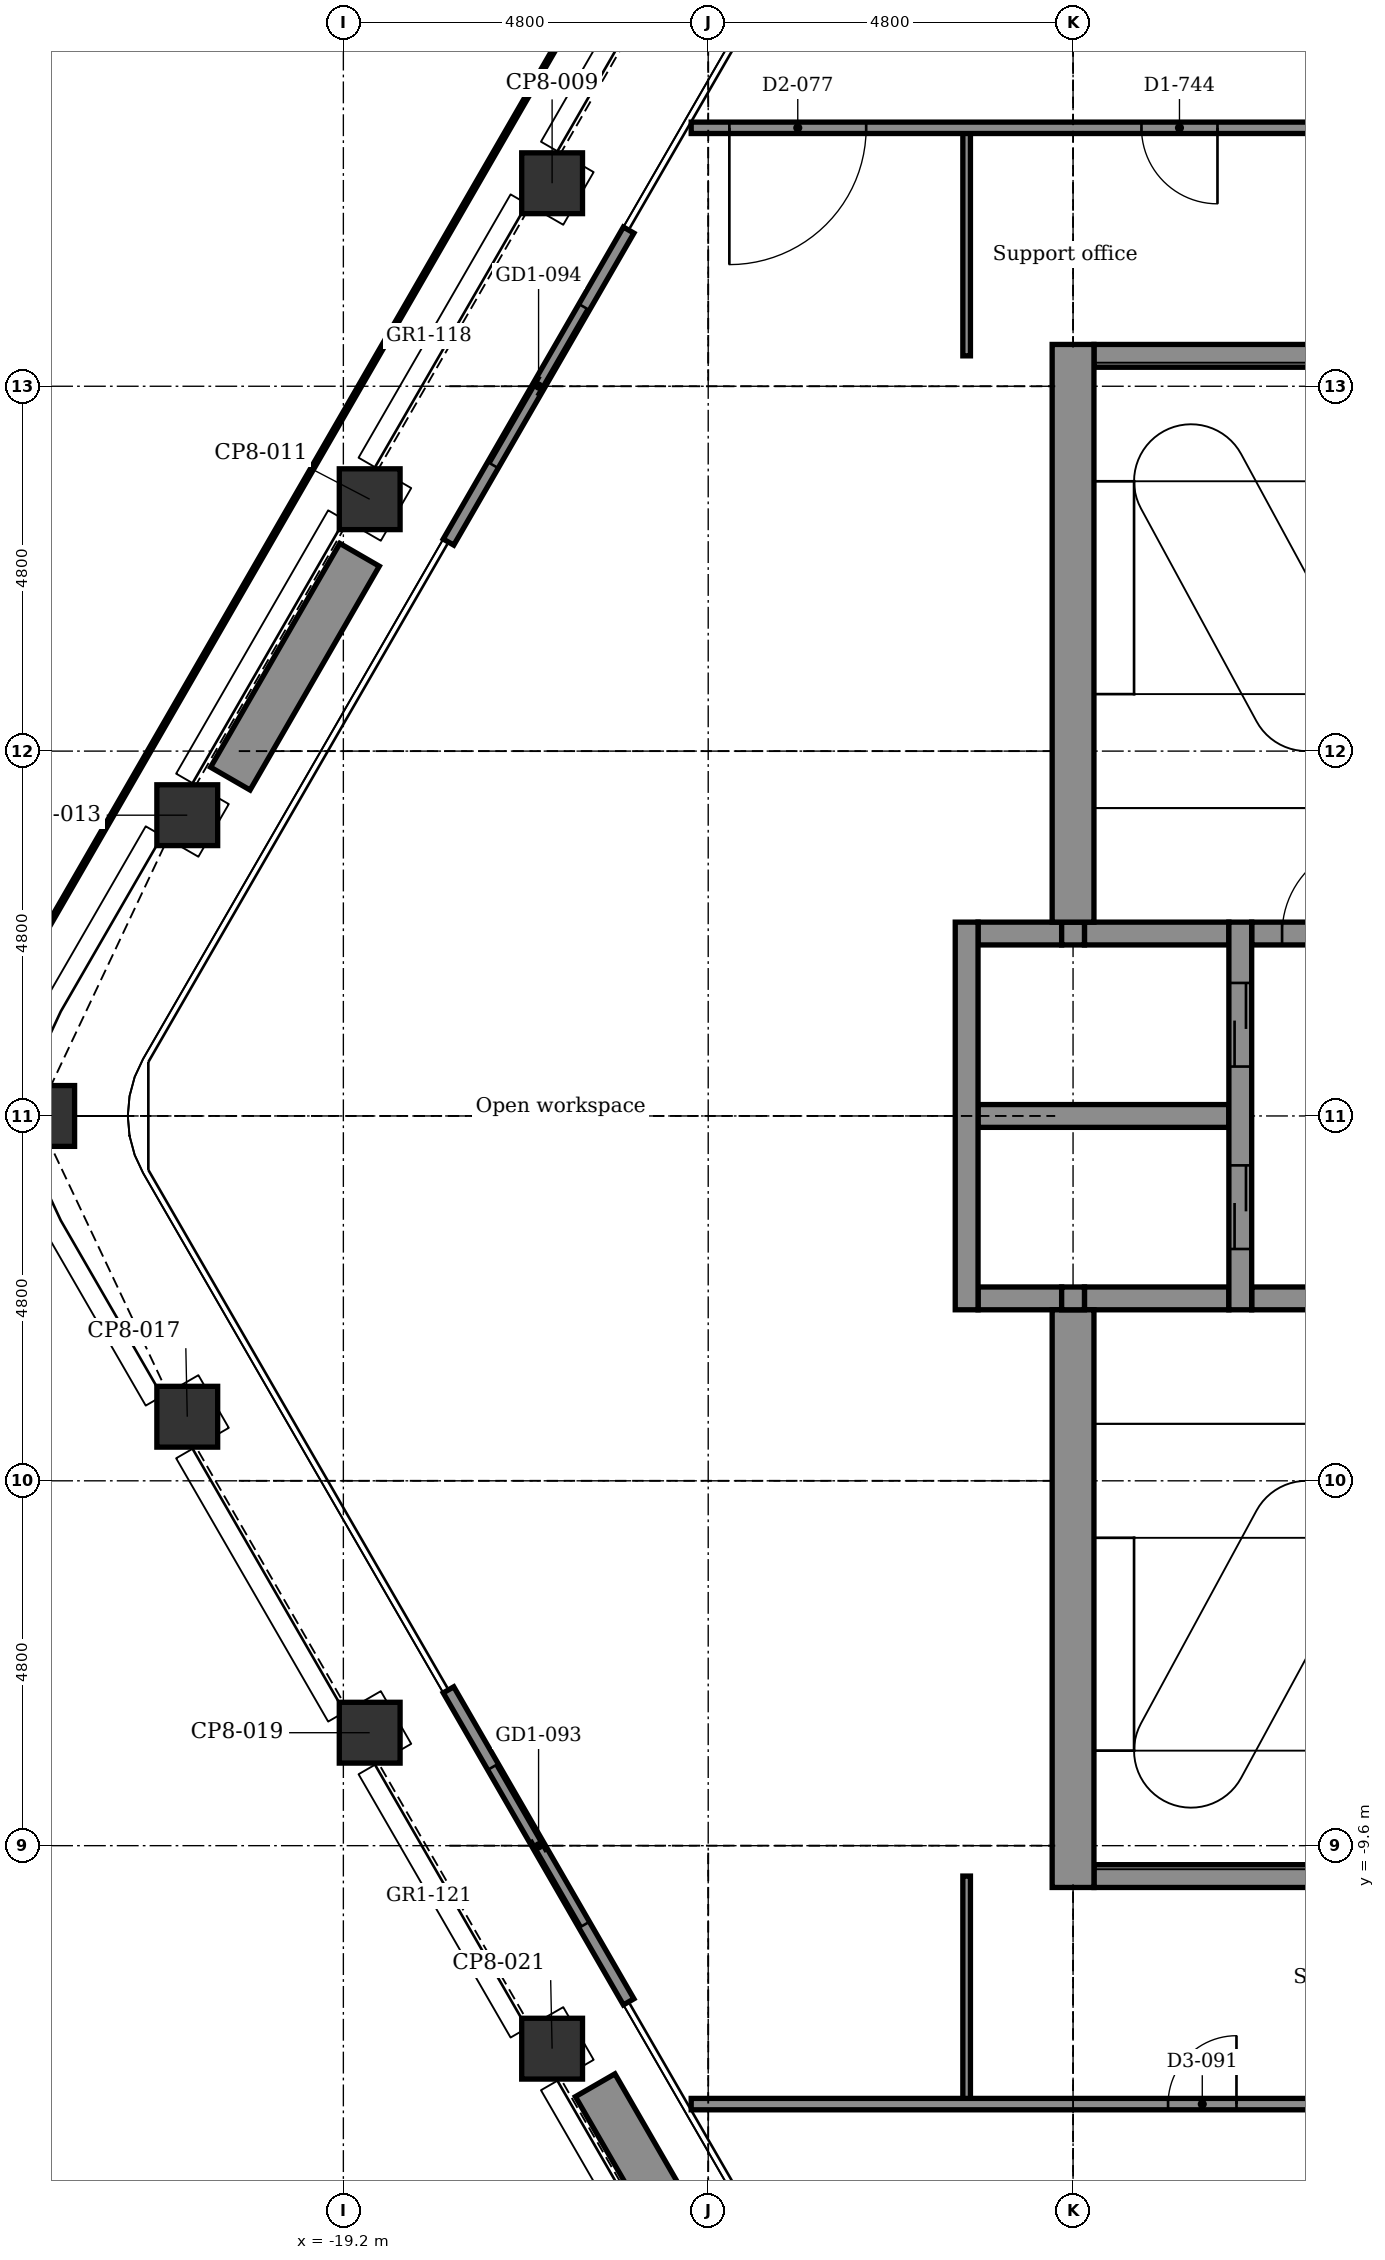
"""IFC4 building model, lengths in metres.
Left out: names, types, materials, properties, quantities, classifications, styles, units other than length and angle.
Written with IfcOpenShell. Run it as: python <this file> out.ifc"""

import sys

from ifc_helpers import new_model, si_unit, direction, frame, frame_2d, origin, origin_2d, place, context, subcontext, project, spatial, rectangle, extrude, element, fill, save


model = new_model("IFC4")
c1 = context("Model", 3, precision=1e-05, world=origin(), true_north=direction((0.0, 1.0)))
c2 = subcontext(c1, "Body", "Model", "MODEL_VIEW")
j1 = project(units=[si_unit("LENGTHUNIT", "METRE"), si_unit("PLANEANGLEUNIT", "RADIAN")], contexts=[c1])
p1 = place(None, origin())
s1 = spatial("IfcSite", under=j1, at=p1, CompositionType="ELEMENT")
p2 = place(p1, origin())
s2 = spatial("IfcBuilding", under=s1, at=p2, CompositionType="ELEMENT")
p3 = place(p2, frame((0.0, 0.0, 285.2)))
s3 = spatial("IfcBuildingStorey", under=s2, at=p3, CompositionType="ELEMENT", Elevation=285.2)
for number, where, z_axis, x_axis in (
    (1, (-16.454, -12.271, -0.15), (0.0, 0.0, 1.0), (0.866, 0.5, 0.0)),
    (2, (-18.854, -8.114, -0.15), (0.0, 0.0, 1.0), (0.866, 0.5, 0.0)),
    (3, (-21.254, -3.957, -0.15), (0.0, 0.0, 1.0), (0.866, 0.5, 0.0)),
    (4, (-23.136, 0.0, -0.15), (0.0, 0.0, 1.0), (1.0, 0.0, 0.0)),
    (5, (-21.254, 3.957, -0.15), (0.0, 0.0, 1.0), (0.5, 0.866, 0.0)),
    (6, (-18.854, 8.114, -0.15), (0.0, 0.0, 1.0), (0.5, 0.866, 0.0)),
    (7, (-16.454, 12.271, -0.15), (0.0, 0.0, 1.0), (0.5, 0.866, 0.0)),
):
    element("IfcColumn", number, at=place(p3, frame(where, z_axis=z_axis, x_axis=x_axis)), inside=s3, PredefinedType="COLUMN", context=c2, shape_type="SweptSolid", body=[
        extrude(rectangle(XDim=0.8, YDim=0.8, at=origin_2d()), origin(), (0.0, 0.0, 1.0), 3.9),
    ])
p4 = place(p3, frame((-9.325, -10.0, -0.15), z_axis=(0.0, 0.0, 1.0), x_axis=(1.0, 0.0, 0.0)))
e8 = element("IfcWall", 8, at=p4, inside=s3, PredefinedType="STANDARD", context=c2, shape_type="SweptSolid", body=[
    extrude(rectangle(XDim=4.075, YDim=0.3, at=frame_2d((2.038, 0.0))), origin(), (0.0, 0.0, 1.0), 3.9),
])
p5 = place(p3, frame((-10.85, -2.4, -0.15), z_axis=(0.0, 0.0, 1.0), x_axis=(1.0, 0.0, 0.0)))
e9 = element("IfcWall", 9, at=p5, inside=s3, PredefinedType="STANDARD", context=c2, shape_type="SweptSolid", body=[
    extrude(rectangle(XDim=1.1, YDim=0.3, at=frame_2d((0.55, 0.0))), origin(), (0.0, 0.0, 1.0), 3.9),
])
p6 = place(p3, frame((-9.45, -2.4, -0.15), z_axis=(0.0, 0.0, 1.0), x_axis=(1.0, 0.0, 0.0)))
e10 = element("IfcWall", 10, at=p6, inside=s3, PredefinedType="STANDARD", context=c2, shape_type="SweptSolid", body=[
    extrude(rectangle(XDim=1.9, YDim=0.3, at=frame_2d((0.95, 0.0))), origin(), (0.0, 0.0, 1.0), 3.9),
])
p7 = place(p3, frame((-7.25, -2.4, -0.15), z_axis=(0.0, 0.0, 1.0), x_axis=(1.0, 0.0, 0.0)))
e11 = element("IfcWall", 11, at=p7, inside=s3, PredefinedType="STANDARD", context=c2, shape_type="SweptSolid", body=[
    extrude(rectangle(XDim=2.0, YDim=0.3, at=frame_2d((1.0, 0.0))), origin(), (0.0, 0.0, 1.0), 3.9),
])
p8 = place(p3, frame((-10.85, 0.0, -0.15), z_axis=(0.0, 0.0, 1.0), x_axis=(1.0, 0.0, 0.0)))
e12 = element("IfcWall", 12, at=p8, inside=s3, PredefinedType="STANDARD", context=c2, shape_type="SweptSolid", body=[
    extrude(rectangle(XDim=3.3, YDim=0.3, at=frame_2d((1.65, 0.0))), origin(), (0.0, 0.0, 1.0), 3.9),
])
p9 = place(p3, frame((-10.85, 2.4, -0.15), z_axis=(0.0, 0.0, 1.0), x_axis=(1.0, 0.0, 0.0)))
e13 = element("IfcWall", 13, at=p9, inside=s3, PredefinedType="STANDARD", context=c2, shape_type="SweptSolid", body=[
    extrude(rectangle(XDim=1.1, YDim=0.3, at=frame_2d((0.55, 0.0))), origin(), (0.0, 0.0, 1.0), 3.9),
])
p10 = place(p3, frame((-9.45, 2.4, -0.15), z_axis=(0.0, 0.0, 1.0), x_axis=(1.0, 0.0, 0.0)))
e14 = element("IfcWall", 14, at=p10, inside=s3, PredefinedType="STANDARD", context=c2, shape_type="SweptSolid", body=[
    extrude(rectangle(XDim=1.9, YDim=0.3, at=frame_2d((0.95, 0.0))), origin(), (0.0, 0.0, 1.0), 3.9),
])
p11 = place(p3, frame((-7.25, 2.4, -0.15), z_axis=(0.0, 0.0, 1.0), x_axis=(1.0, 0.0, 0.0)))
e15 = element("IfcWall", 15, at=p11, inside=s3, PredefinedType="STANDARD", context=c2, shape_type="SweptSolid", body=[
    extrude(rectangle(XDim=2.0, YDim=0.3, at=frame_2d((1.0, 0.0))), origin(), (0.0, 0.0, 1.0), 3.9),
])
p12 = place(p11, frame((0.4, 0.0, 0.15)))
e16 = element("IfcOpeningElement", 16, at=p12, cuts=e15, PredefinedType="OPENING", context=c2, shape_type="SweptSolid", body=[
    extrude(rectangle(XDim=1.2, YDim=2.1, at=frame_2d((0.6, 1.05))), frame((0.0, 0.16, 0.0), z_axis=(0.0, -1.0, 0.0), x_axis=(1.0, 0.0, 0.0)), (0.0, 0.0, 1.0), 0.32),
])
p13 = place(p3, frame((-9.325, 10.0, -0.15), z_axis=(0.0, 0.0, 1.0), x_axis=(1.0, 0.0, 0.0)))
e17 = element("IfcWall", 17, at=p13, inside=s3, PredefinedType="STANDARD", context=c2, shape_type="SweptSolid", body=[
    extrude(rectangle(XDim=4.075, YDim=0.3, at=frame_2d((2.038, 0.0))), origin(), (0.0, 0.0, 1.0), 3.9),
])
p14 = place(p3, frame((-11.0, -2.55, -0.15), z_axis=(0.0, 0.0, 1.0), x_axis=(0.0, 1.0, 0.0)))
e18 = element("IfcWall", 18, at=p14, inside=s3, PredefinedType="STANDARD", context=c2, shape_type="SweptSolid", body=[
    extrude(rectangle(XDim=5.1, YDim=0.3, at=frame_2d((2.55, 0.0))), origin(), (0.0, 0.0, 1.0), 3.9),
])
p15 = place(p3, frame((-9.6, -10.15, -0.15), z_axis=(0.0, 0.0, 1.0), x_axis=(0.0, 1.0, 0.0)))
e19 = element("IfcWall", 19, at=p15, inside=s3, PredefinedType="SHEAR", context=c2, shape_type="SweptSolid", body=[
    extrude(rectangle(XDim=7.6, YDim=0.55, at=frame_2d((3.8, 0.0))), origin(), (0.0, 0.0, 1.0), 3.9),
])
for number, where, z_axis, x_axis in (
    (20, (-9.6, -2.55, -0.15), (0.0, 0.0, 1.0), (0.0, 1.0, 0.0)),
    (21, (-9.6, 2.25, -0.15), (0.0, 0.0, 1.0), (0.0, 1.0, 0.0)),
):
    element("IfcWall", number, at=place(p3, frame(where, z_axis=z_axis, x_axis=x_axis)), inside=s3, PredefinedType="STANDARD", context=c2, shape_type="SweptSolid", body=[
        extrude(rectangle(XDim=0.3, YDim=0.3, at=frame_2d((0.15, 0.0))), origin(), (0.0, 0.0, 1.0), 3.9),
    ])
p16 = place(p3, frame((-9.6, 2.55, -0.15), z_axis=(0.0, 0.0, 1.0), x_axis=(0.0, 1.0, 0.0)))
e22 = element("IfcWall", 22, at=p16, inside=s3, PredefinedType="SHEAR", context=c2, shape_type="SweptSolid", body=[
    extrude(rectangle(XDim=7.6, YDim=0.55, at=frame_2d((3.8, 0.0))), origin(), (0.0, 0.0, 1.0), 3.9),
])
p17 = place(p3, frame((-7.4, -2.55, -0.15), z_axis=(0.0, 0.0, 1.0), x_axis=(0.0, 1.0, 0.0)))
e23 = element("IfcWall", 23, at=p17, inside=s3, PredefinedType="STANDARD", context=c2, shape_type="SweptSolid", body=[
    extrude(rectangle(XDim=5.1, YDim=0.3, at=frame_2d((2.55, 0.0))), origin(), (0.0, 0.0, 1.0), 3.9),
])
p18 = place(p17, frame((0.8, 0.0, 0.15)))
e24 = element("IfcOpeningElement", 24, at=p18, cuts=e23, PredefinedType="OPENING", context=c2, shape_type="SweptSolid", body=[
    extrude(rectangle(XDim=1.1, YDim=2.1, at=frame_2d((0.55, 1.05))), frame((0.0, 0.16, 0.0), z_axis=(0.0, -1.0, 0.0), x_axis=(1.0, 0.0, 0.0)), (0.0, 0.0, 1.0), 0.32),
])
p19 = place(p17, frame((3.2, 0.0, 0.15)))
e25 = element("IfcOpeningElement", 25, at=p19, cuts=e23, PredefinedType="OPENING", context=c2, shape_type="SweptSolid", body=[
    extrude(rectangle(XDim=1.1, YDim=2.1, at=frame_2d((0.55, 1.05))), frame((0.0, 0.16, 0.0), z_axis=(0.0, -1.0, 0.0), x_axis=(1.0, 0.0, 0.0)), (0.0, 0.0, 1.0), 0.32),
])
p20 = place(p3, frame((-15.447, -11.655, 0.0), z_axis=(0.0, 0.0, 1.0), x_axis=(-0.499978080042, 0.866038058908, 0.0)))
e26 = element("IfcWall", 26, at=p20, inside=s3, PredefinedType="PARTITIONING", context=c2, shape_type="SweptSolid", body=[
    extrude(rectangle(XDim=4.74, YDim=0.16, at=frame_2d((2.37, 0.0))), origin(), (0.0, 0.0, 1.0), 3.75),
])
p21 = place(p20, frame((1.17, 0.0, 0.0)))
e27 = element("IfcOpeningElement", 27, at=p21, cuts=e26, PredefinedType="OPENING", context=c2, shape_type="SweptSolid", body=[
    extrude(rectangle(XDim=2.4, YDim=2.4, at=frame_2d((1.2, 1.2))), frame((0.0, 0.09, 0.0), z_axis=(0.0, -1.0, 0.0), x_axis=(1.0, 0.0, 0.0)), (0.0, 0.0, 1.0), 0.18),
])
p22 = place(p3, frame((-17.817, 7.55, 0.0), z_axis=(0.0, 0.0, 1.0), x_axis=(0.499978080042, 0.866038058908, 0.0)))
e28 = element("IfcWall", 28, at=p22, inside=s3, PredefinedType="PARTITIONING", context=c2, shape_type="SweptSolid", body=[
    extrude(rectangle(XDim=4.74, YDim=0.16, at=frame_2d((2.37, 0.0))), origin(), (0.0, 0.0, 1.0), 3.75),
])
p23 = place(p22, frame((1.17, 0.0, 0.0)))
e29 = element("IfcOpeningElement", 29, at=p23, cuts=e28, PredefinedType="OPENING", context=c2, shape_type="SweptSolid", body=[
    extrude(rectangle(XDim=2.4, YDim=2.4, at=frame_2d((1.2, 1.2))), frame((0.0, 0.09, 0.0), z_axis=(0.0, -1.0, 0.0), x_axis=(1.0, 0.0, 0.0)), (0.0, 0.0, 1.0), 0.18),
])
p24 = place(p3, frame((-14.187, -15.697, 0.0), z_axis=(0.0, 0.0, 1.0), x_axis=(-0.499977295307, 0.866038511948, 0.0)))
e30 = element("IfcWall", 30, at=p24, inside=s3, PredefinedType="USERDEFINED", context=c2, shape_type="SweptSolid", body=[
    extrude(rectangle(XDim=3.4, YDim=0.6, at=frame_2d((1.7, 0.0))), origin(), (0.0, 0.0, 1.0), 0.7),
])
p25 = place(p3, frame((-20.687, 4.438, 0.0), z_axis=(0.0, 0.0, 1.0), x_axis=(0.500008388397, 0.866020560687, 0.0)))
e31 = element("IfcWall", 31, at=p25, inside=s3, PredefinedType="USERDEFINED", context=c2, shape_type="SweptSolid", body=[
    extrude(rectangle(XDim=3.4, YDim=0.6, at=frame_2d((1.7, 0.0))), origin(), (0.0, 0.0, 1.0), 0.7),
])
for number, where, z_axis, x_axis in (
    (32, (-11.0, -13.0, 0.0), (0.0, 0.0, 1.0), (0.0, 1.0, 0.0)),
    (33, (-11.0, 10.0, 0.0), (0.0, 0.0, 1.0), (0.0, 1.0, 0.0)),
):
    element("IfcWall", number, at=place(p3, frame(where, z_axis=z_axis, x_axis=x_axis)), inside=s3, PredefinedType="PARTITIONING", context=c2, shape_type="SweptSolid", body=[
        extrude(rectangle(XDim=3.0, YDim=0.1, at=frame_2d((1.5, 0.0))), origin(), (0.0, 0.0, 1.0), 3.75),
    ])
p26 = place(p3, frame((-14.624, -13.0, 0.0), z_axis=(0.0, 0.0, 1.0), x_axis=(1.0, 0.0, 0.0)))
e34 = element("IfcWall", 34, at=p26, inside=s3, PredefinedType="PARTITIONING", context=c2, shape_type="SweptSolid", body=[
    extrude(rectangle(XDim=17.024, YDim=0.15, at=frame_2d((8.512, 0.0))), origin(), (0.0, 0.0, 1.0), 3.75),
])
p27 = place(p26, frame((6.274, 0.0, 0.0)))
e35 = element("IfcOpeningElement", 35, at=p27, cuts=e34, PredefinedType="OPENING", context=c2, shape_type="SweptSolid", body=[
    extrude(rectangle(XDim=0.9, YDim=2.1, at=frame_2d((0.45, 1.05))), frame((0.0, 0.085, 0.0), z_axis=(0.0, -1.0, 0.0), x_axis=(1.0, 0.0, 0.0)), (0.0, 0.0, 1.0), 0.17),
])
p28 = place(p26, frame((11.774, 0.0, 0.0)))
e36 = element("IfcOpeningElement", 36, at=p28, cuts=e34, PredefinedType="OPENING", context=c2, shape_type="SweptSolid", body=[
    extrude(rectangle(XDim=0.9, YDim=2.1, at=frame_2d((0.45, 1.05))), frame((0.0, 0.085, 0.0), z_axis=(0.0, -1.0, 0.0), x_axis=(1.0, 0.0, 0.0)), (0.0, 0.0, 1.0), 0.17),
])
p29 = place(p3, frame((-14.624, 13.0, 0.0), z_axis=(0.0, 0.0, 1.0), x_axis=(1.0, 0.0, 0.0)))
e37 = element("IfcWall", 37, at=p29, inside=s3, PredefinedType="PARTITIONING", context=c2, shape_type="SweptSolid", body=[
    extrude(rectangle(XDim=9.224, YDim=0.15, at=frame_2d((4.612, 0.0))), origin(), (0.0, 0.0, 1.0), 3.75),
])
p30 = place(p29, frame((5.924, 0.0, 0.0)))
e38 = element("IfcOpeningElement", 38, at=p30, cuts=e37, PredefinedType="OPENING", context=c2, shape_type="SweptSolid", body=[
    extrude(rectangle(XDim=1.0, YDim=2.1, at=frame_2d((0.5, 1.05))), frame((0.0, 0.085, 0.0), z_axis=(0.0, -1.0, 0.0), x_axis=(1.0, 0.0, 0.0)), (0.0, 0.0, 1.0), 0.17),
])
p31 = place(p29, frame((0.502, 0.0, 0.0)))
e39 = element("IfcOpeningElement", 39, at=p31, cuts=e37, PredefinedType="OPENING", context=c2, shape_type="SweptSolid", body=[
    extrude(rectangle(XDim=1.8, YDim=2.1, at=frame_2d((0.9, 1.05))), frame((0.0, 0.085, 0.0), z_axis=(0.0, -1.0, 0.0), x_axis=(1.0, 0.0, 0.0)), (0.0, 0.0, 1.0), 0.17),
])
p32 = place(p21, origin())
e40 = element("IfcDoor", 40, at=p32, inside=s3, OperationType="DOUBLE_DOOR_SLIDING", PredefinedType="DOOR", context=c2, shape_type="SweptSolid", body=[
    extrude(rectangle(XDim=2.4, YDim=2.4, at=frame_2d((1.2, 1.2))), frame((0.0, 0.025, 0.0), z_axis=(0.0, -1.0, 0.0), x_axis=(1.0, 0.0, 0.0)), (0.0, 0.0, 1.0), 0.05),
])
fill(e27, e40)
p33 = place(p23, origin())
e41 = element("IfcDoor", 41, at=p33, inside=s3, OperationType="DOUBLE_DOOR_SLIDING", PredefinedType="DOOR", context=c2, shape_type="SweptSolid", body=[
    extrude(rectangle(XDim=2.4, YDim=2.4, at=frame_2d((1.2, 1.2))), frame((0.0, 0.025, 0.0), z_axis=(0.0, -1.0, 0.0), x_axis=(1.0, 0.0, 0.0)), (0.0, 0.0, 1.0), 0.05),
])
fill(e29, e41)
p34 = place(p30, frame((1.0, 0.0, 0.0), z_axis=(0.0, 0.0, 1.0), x_axis=(-1.0, 0.0, 0.0)))
e42 = element("IfcDoor", 42, at=p34, inside=s3, OperationType="SINGLE_SWING_RIGHT", PredefinedType="DOOR", context=c2, shape_type="SweptSolid", body=[
    extrude(rectangle(XDim=1.0, YDim=2.1, at=frame_2d((0.5, 1.05))), frame((0.0, 0.025, 0.0), z_axis=(0.0, -1.0, 0.0), x_axis=(1.0, 0.0, 0.0)), (0.0, 0.0, 1.0), 0.05),
])
fill(e38, e42)
p35 = place(p27, origin())
e43 = element("IfcDoor", 43, at=p35, inside=s3, OperationType="SINGLE_SWING_RIGHT", PredefinedType="DOOR", context=c2, shape_type="SweptSolid", body=[
    extrude(rectangle(XDim=0.9, YDim=2.1, at=frame_2d((0.45, 1.05))), frame((0.0, 0.025, 0.0), z_axis=(0.0, -1.0, 0.0), x_axis=(1.0, 0.0, 0.0)), (0.0, 0.0, 1.0), 0.05),
])
fill(e35, e43)
p36 = place(p31, frame((1.8, 0.0, 0.0), z_axis=(0.0, 0.0, 1.0), x_axis=(-1.0, 0.0, 0.0)))
e44 = element("IfcDoor", 44, at=p36, inside=s3, OperationType="SINGLE_SWING_LEFT", PredefinedType="DOOR", context=c2, shape_type="SweptSolid", body=[
    extrude(rectangle(XDim=1.8, YDim=2.1, at=frame_2d((0.9, 1.05))), frame((0.0, 0.025, 0.0), z_axis=(0.0, -1.0, 0.0), x_axis=(1.0, 0.0, 0.0)), (0.0, 0.0, 1.0), 0.05),
])
fill(e39, e44)
p37 = place(p18, origin())
e45 = element("IfcDoor", 45, at=p37, inside=s3, OperationType="DOUBLE_DOOR_SLIDING", PredefinedType="DOOR", context=c2, shape_type="SweptSolid", body=[
    extrude(rectangle(XDim=1.1, YDim=2.1, at=frame_2d((0.55, 1.05))), frame((0.0, 0.025, 0.0), z_axis=(0.0, -1.0, 0.0), x_axis=(1.0, 0.0, 0.0)), (0.0, 0.0, 1.0), 0.05),
])
fill(e24, e45)
p38 = place(p19, origin())
e46 = element("IfcDoor", 46, at=p38, inside=s3, OperationType="DOUBLE_DOOR_SLIDING", PredefinedType="DOOR", context=c2, shape_type="SweptSolid", body=[
    extrude(rectangle(XDim=1.1, YDim=2.1, at=frame_2d((0.55, 1.05))), frame((0.0, 0.025, 0.0), z_axis=(0.0, -1.0, 0.0), x_axis=(1.0, 0.0, 0.0)), (0.0, 0.0, 1.0), 0.05),
])
fill(e25, e46)
p39 = place(p12, origin())
e47 = element("IfcDoor", 47, at=p39, inside=s3, OperationType="SINGLE_SWING_RIGHT", PredefinedType="DOOR", context=c2, shape_type="SweptSolid", body=[
    extrude(rectangle(XDim=1.2, YDim=2.1, at=frame_2d((0.6, 1.05))), frame((0.0, 0.025, 0.0), z_axis=(0.0, -1.0, 0.0), x_axis=(1.0, 0.0, 0.0)), (0.0, 0.0, 1.0), 0.05),
])
fill(e16, e47)
save(model, sys.argv[1])
